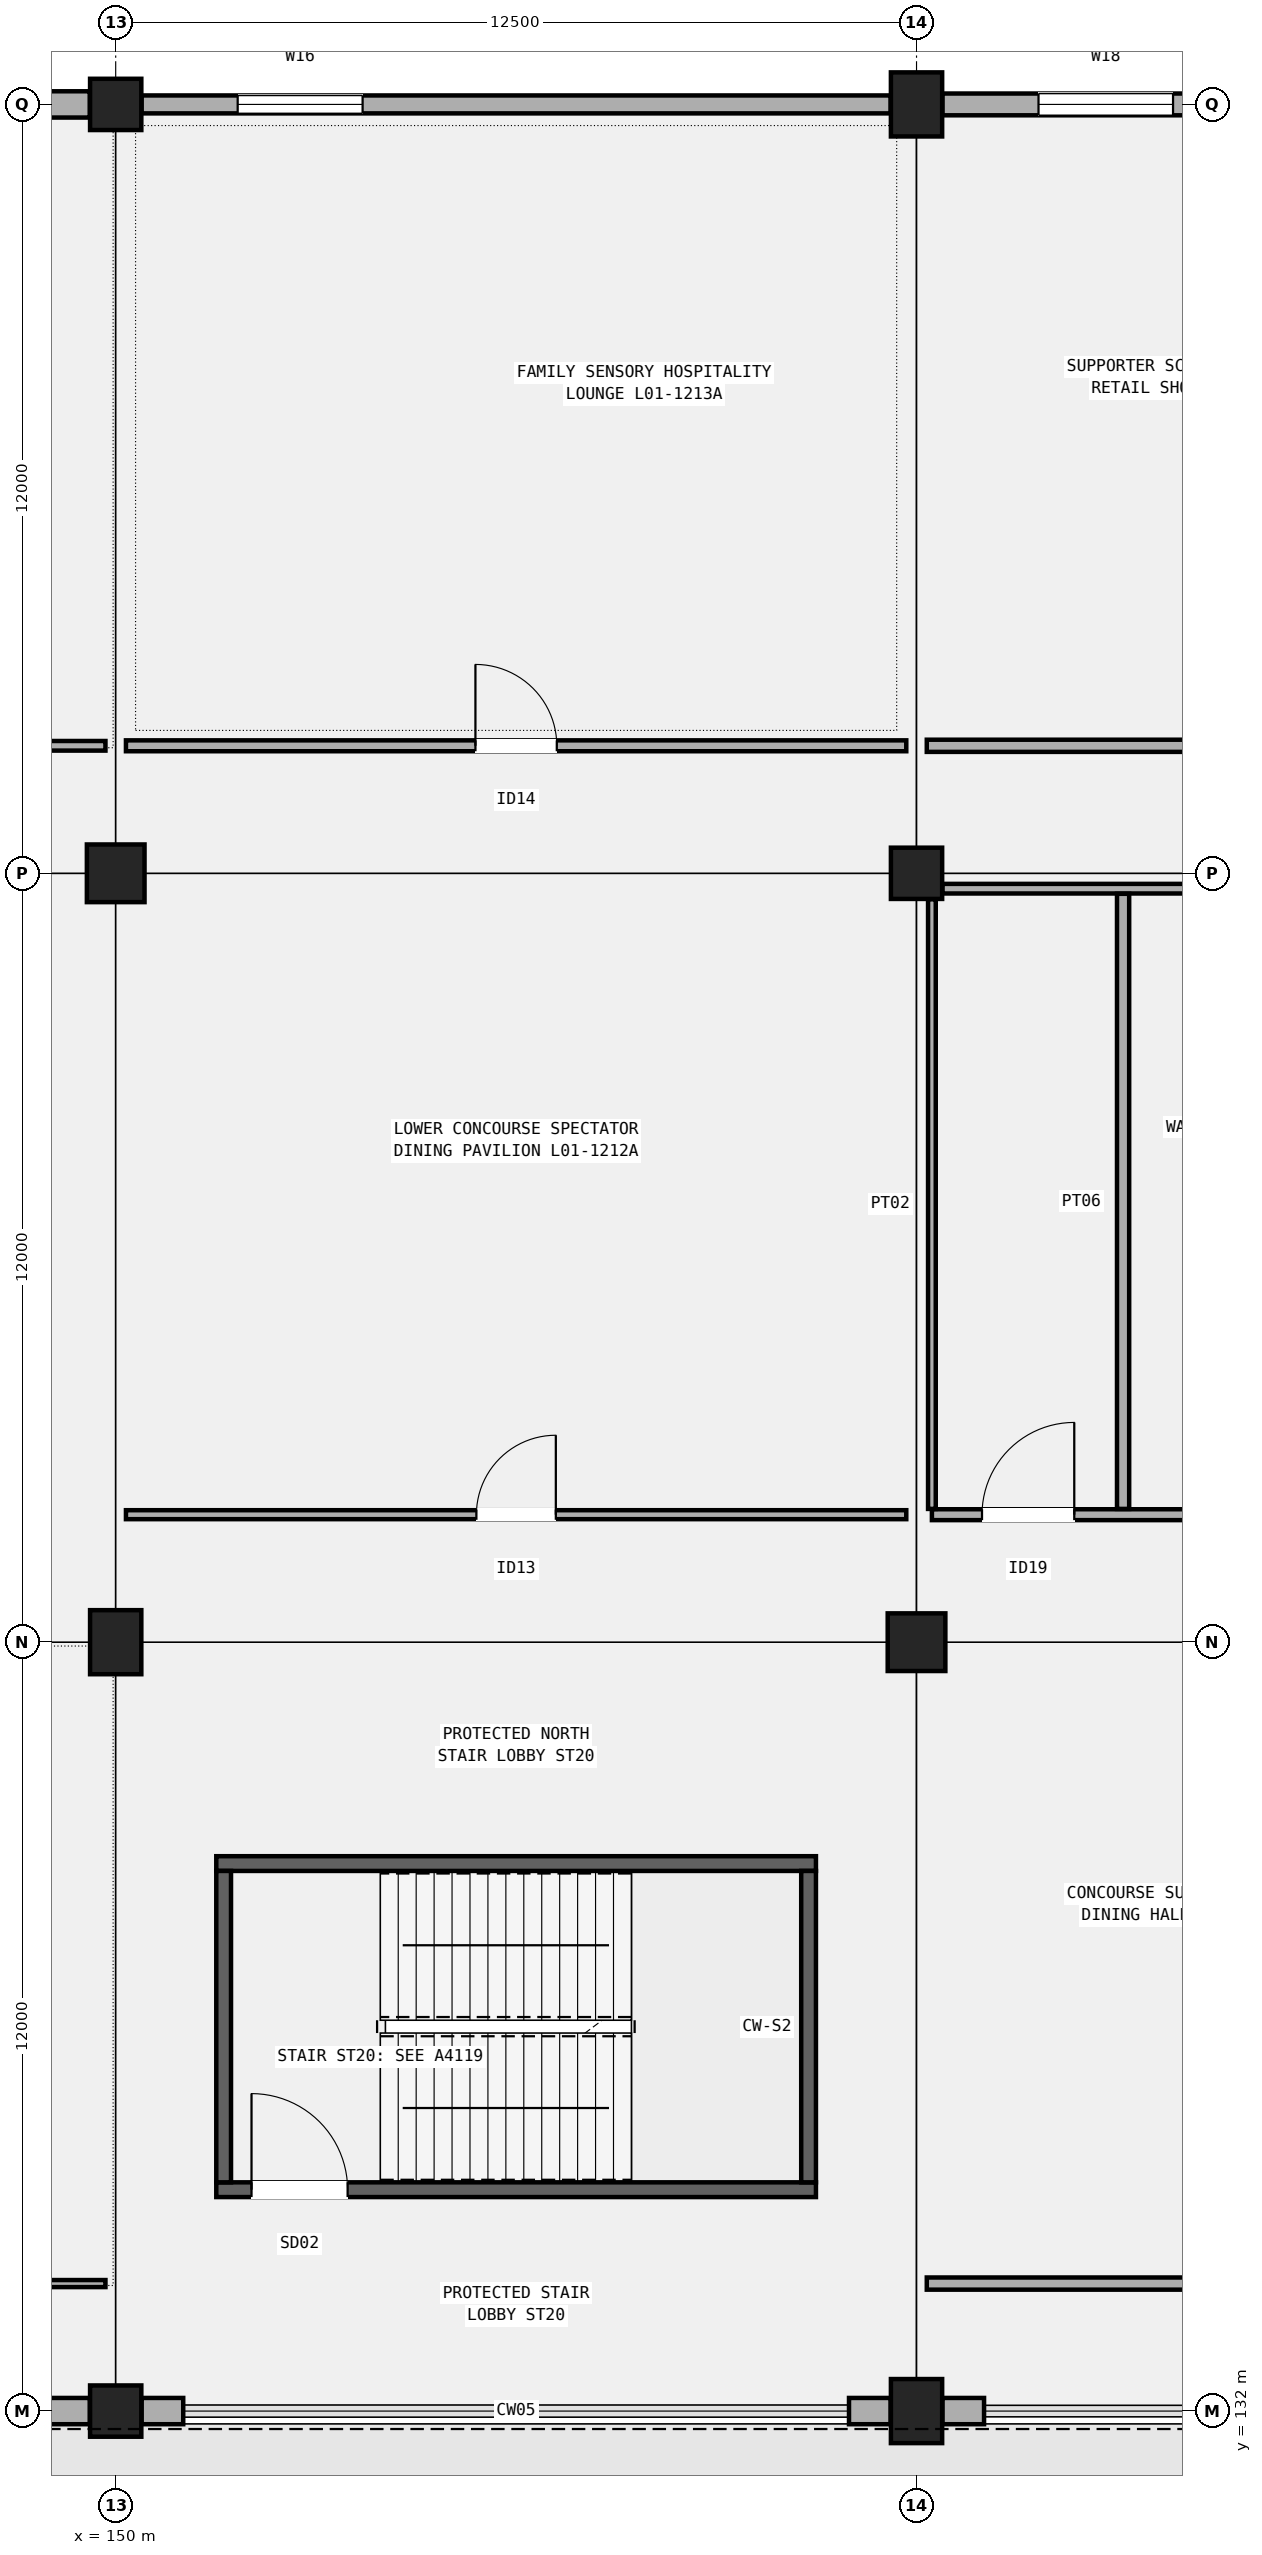
"""IFC4 building model, lengths in metres.
Left out: names, types, materials, properties, quantities, classifications, styles, units other than length and angle.
Written with IfcOpenShell. Run it as: python <this file> out.ifc"""

import sys

from ifc_helpers import new_model, si_unit, direction, frame, frame_2d, origin, origin_2d, place, context, subcontext, project, spatial, rectangle, extrude, element, fill, save


model = new_model("IFC4")
c1 = context("Model", 3, precision=1e-05, world=origin(), true_north=direction((0.0, 1.0)))
c2 = subcontext(c1, "Body", "Model", "MODEL_VIEW")
j1 = project(units=[si_unit("LENGTHUNIT", "METRE"), si_unit("PLANEANGLEUNIT", "RADIAN")], contexts=[c1])
p1 = place(None, origin())
s1 = spatial("IfcSite", under=j1, at=p1, CompositionType="ELEMENT")
p2 = place(p1, origin())
s2 = spatial("IfcBuilding", under=s1, at=p2, CompositionType="ELEMENT")
p3 = place(p2, frame((0.0, 0.0, 5.4)))
s3 = spatial("IfcBuildingStorey", under=s2, at=p3, CompositionType="ELEMENT", Elevation=5.4)
p4 = place(p3, frame((150.0, 132.0, 0.0), z_axis=(0.0, 0.0, 1.0), x_axis=(1.0, 0.0, 0.0)))
e1 = element("IfcColumn", 1, at=p4, inside=s3, PredefinedType="COLUMN", context=c2, shape_type="SweptSolid", body=[
    extrude(rectangle(XDim=0.8, YDim=0.8, at=origin_2d()), origin(), (0.0, 0.0, 1.0), 4.8),
])
p5 = place(p3, frame((150.0, 144.0, 0.0), z_axis=(0.0, 0.0, 1.0), x_axis=(1.0, 0.0, 0.0)))
e2 = element("IfcColumn", 2, at=p5, inside=s3, PredefinedType="COLUMN", context=c2, shape_type="SweptSolid", body=[
    extrude(rectangle(XDim=0.8, YDim=1.0, at=origin_2d()), origin(), (0.0, 0.0, 1.0), 4.8),
])
p6 = place(p3, frame((150.0, 156.0, 0.0), z_axis=(0.0, 0.0, 1.0), x_axis=(1.0, 0.0, 0.0)))
e3 = element("IfcColumn", 3, at=p6, inside=s3, PredefinedType="COLUMN", context=c2, shape_type="SweptSolid", body=[
    extrude(rectangle(XDim=0.9, YDim=0.9, at=origin_2d()), origin(), (0.0, 0.0, 1.0), 4.8),
])
p7 = place(p3, frame((150.0, 168.0, 0.0), z_axis=(0.0, 0.0, 1.0), x_axis=(1.0, 0.0, 0.0)))
e4 = element("IfcColumn", 4, at=p7, inside=s3, PredefinedType="COLUMN", context=c2, shape_type="SweptSolid", body=[
    extrude(rectangle(XDim=0.8, YDim=0.8, at=origin_2d()), origin(), (0.0, 0.0, 1.0), 4.8),
])
p8 = place(p3, frame((162.5, 132.0, 0.0), z_axis=(0.0, 0.0, 1.0), x_axis=(1.0, 0.0, 0.0)))
e5 = element("IfcColumn", 5, at=p8, inside=s3, PredefinedType="COLUMN", context=c2, shape_type="SweptSolid", body=[
    extrude(rectangle(XDim=0.8, YDim=1.0, at=origin_2d()), origin(), (0.0, 0.0, 1.0), 4.8),
])
p9 = place(p3, frame((162.5, 144.0, 0.0), z_axis=(0.0, 0.0, 1.0), x_axis=(1.0, 0.0, 0.0)))
e6 = element("IfcColumn", 6, at=p9, inside=s3, PredefinedType="COLUMN", context=c2, shape_type="SweptSolid", body=[
    extrude(rectangle(XDim=0.9, YDim=0.9, at=origin_2d()), origin(), (0.0, 0.0, 1.0), 4.8),
])
p10 = place(p3, frame((162.5, 156.0, 0.0), z_axis=(0.0, 0.0, 1.0), x_axis=(1.0, 0.0, 0.0)))
e7 = element("IfcColumn", 7, at=p10, inside=s3, PredefinedType="COLUMN", context=c2, shape_type="SweptSolid", body=[
    extrude(rectangle(XDim=0.8, YDim=0.8, at=origin_2d()), origin(), (0.0, 0.0, 1.0), 4.8),
])
p11 = place(p3, frame((162.5, 168.0, 0.0), z_axis=(0.0, 0.0, 1.0), x_axis=(1.0, 0.0, 0.0)))
e8 = element("IfcColumn", 8, at=p11, inside=s3, PredefinedType="COLUMN", context=c2, shape_type="SweptSolid", body=[
    extrude(rectangle(XDim=0.8, YDim=1.0, at=origin_2d()), origin(), (0.0, 0.0, 1.0), 4.8),
])
p12 = place(p3, frame((148.946, 132.0, 0.0), z_axis=(0.0, 0.0, 1.0), x_axis=(1.0, 0.0, 0.0)))
e9 = element("IfcWall", 9, at=p12, inside=s3, PredefinedType="SOLIDWALL", context=c2, shape_type="SweptSolid", body=[
    extrude(rectangle(XDim=0.65, YDim=0.41, at=frame_2d((0.325, 0.0))), origin(), (0.0, 0.0, 1.0), 4.15),
])
p13 = place(p3, frame((137.954, 168.0, 0.0), z_axis=(0.0, 0.0, 1.0), x_axis=(1.0, 0.0, 0.0)))
e10 = element("IfcWall", 10, at=p13, inside=s3, PredefinedType="SOLIDWALL", context=c2, shape_type="SweptSolid", body=[
    extrude(rectangle(XDim=11.642, YDim=0.41, at=frame_2d((5.821, 0.0))), origin(), (0.0, 0.0, 1.0), 4.2),
])
p14 = place(p13, frame((1.5, 0.0, 0.95)))
e11 = element("IfcOpeningElement", 11, at=p14, cuts=e10, PredefinedType="OPENING", context=c2, shape_type="SweptSolid", body=[
    extrude(rectangle(XDim=1.8, YDim=2.15, at=frame_2d((0.9, 1.075))), frame((0.0, 0.215, 0.0), z_axis=(0.0, -1.0, 0.0), x_axis=(1.0, 0.0, 0.0)), (0.0, 0.0, 1.0), 0.43),
])
for number, where, z_axis, x_axis in (
    (12, (150.404, 132.0, 0.0), (0.0, 0.0, 1.0), (1.0, 0.0, 0.0)),
    (13, (161.446, 132.0, 0.0), (0.0, 0.0, 1.0), (1.0, 0.0, 0.0)),
):
    element("IfcWall", number, at=place(p3, frame(where, z_axis=z_axis, x_axis=x_axis)), inside=s3, PredefinedType="SOLIDWALL", context=c2, shape_type="SweptSolid", body=[
        extrude(rectangle(XDim=0.65, YDim=0.41, at=frame_2d((0.325, 0.0))), origin(), (0.0, 0.0, 1.0), 4.2),
    ])
p15 = place(p3, frame((150.404, 168.0, 0.0), z_axis=(0.0, 0.0, 1.0), x_axis=(1.0, 0.0, 0.0)))
e14 = element("IfcWall", 14, at=p15, inside=s3, PredefinedType="SOLIDWALL", context=c2, shape_type="SweptSolid", body=[
    extrude(rectangle(XDim=11.692, YDim=0.28, at=frame_2d((5.846, 0.0))), origin(), (0.0, 0.0, 1.0), 4.15),
])
p16 = place(p15, frame((1.5, 0.0, 0.95)))
e15 = element("IfcOpeningElement", 15, at=p16, cuts=e14, PredefinedType="OPENING", context=c2, shape_type="SweptSolid", body=[
    extrude(rectangle(XDim=1.95, YDim=1.9, at=frame_2d((0.975, 0.95))), frame((0.0, 0.15, 0.0), z_axis=(0.0, -1.0, 0.0), x_axis=(1.0, 0.0, 0.0)), (0.0, 0.0, 1.0), 0.3),
])
p17 = place(p3, frame((162.904, 132.0, 0.0), z_axis=(0.0, 0.0, 1.0), x_axis=(1.0, 0.0, 0.0)))
e16 = element("IfcWall", 16, at=p17, inside=s3, PredefinedType="SOLIDWALL", context=c2, shape_type="SweptSolid", body=[
    extrude(rectangle(XDim=0.65, YDim=0.41, at=frame_2d((0.325, 0.0))), origin(), (0.0, 0.0, 1.0), 4.15),
])
p18 = place(p3, frame((162.904, 168.0, 0.0), z_axis=(0.0, 0.0, 1.0), x_axis=(1.0, 0.0, 0.0)))
e17 = element("IfcWall", 17, at=p18, inside=s3, PredefinedType="SOLIDWALL", context=c2, shape_type="SweptSolid", body=[
    extrude(rectangle(XDim=11.642, YDim=0.34, at=frame_2d((5.821, 0.0))), origin(), (0.0, 0.0, 1.0), 4.2),
])
p19 = place(p18, frame((1.5, 0.0, 0.95)))
e18 = element("IfcOpeningElement", 18, at=p19, cuts=e17, PredefinedType="OPENING", context=c2, shape_type="SweptSolid", body=[
    extrude(rectangle(XDim=2.1, YDim=1.85, at=frame_2d((1.05, 0.925))), frame((0.0, 0.18, 0.0), z_axis=(0.0, -1.0, 0.0), x_axis=(1.0, 0.0, 0.0)), (0.0, 0.0, 1.0), 0.36),
])
p20 = place(p3, frame((151.57, 135.455, 0.0), z_axis=(0.0, 0.0, 1.0), x_axis=(1.0, 0.0, 0.0)))
e19 = element("IfcWall", 19, at=p20, inside=s3, PredefinedType="SHEAR", context=c2, shape_type="SweptSolid", body=[
    extrude(rectangle(XDim=9.36, YDim=0.23, at=frame_2d((4.68, 0.0))), origin(), (0.0, 0.0, 1.0), 4.55),
])
p21 = place(p20, frame((0.55, 0.0, 0.0)))
e20 = element("IfcOpeningElement", 20, at=p21, cuts=e19, PredefinedType="OPENING", context=c2, shape_type="SweptSolid", body=[
    extrude(rectangle(XDim=1.5, YDim=2.2, at=frame_2d((0.75, 1.1))), frame((0.0, 0.125, 0.0), z_axis=(0.0, -1.0, 0.0), x_axis=(1.0, 0.0, 0.0)), (0.0, 0.0, 1.0), 0.25),
])
p22 = place(p3, frame((151.57, 140.545, 0.0), z_axis=(0.0, 0.0, 1.0), x_axis=(1.0, 0.0, 0.0)))
e21 = element("IfcWall", 21, at=p22, inside=s3, PredefinedType="SHEAR", context=c2, shape_type="SweptSolid", body=[
    extrude(rectangle(XDim=9.36, YDim=0.23, at=frame_2d((4.68, 0.0))), origin(), (0.0, 0.0, 1.0), 4.55),
])
for number, where, z_axis, x_axis in (
    (22, (151.685, 135.57, 0.0), (0.0, 0.0, 1.0), (0.0, 1.0, 0.0)),
    (23, (160.815, 135.57, 0.0), (0.0, 0.0, 1.0), (0.0, 1.0, 0.0)),
):
    element("IfcWall", number, at=place(p3, frame(where, z_axis=z_axis, x_axis=x_axis)), inside=s3, PredefinedType="SHEAR", context=c2, shape_type="SweptSolid", body=[
        extrude(rectangle(XDim=4.86, YDim=0.23, at=frame_2d((2.43, 0.0))), origin(), (0.0, 0.0, 1.0), 4.55),
    ])
p23 = place(p3, frame((139.42, 133.99, 0.0), z_axis=(0.0, 0.0, 1.0), x_axis=(1.0, 0.0, 0.0)))
e24 = element("IfcWall", 24, at=p23, inside=s3, PredefinedType="PARTITIONING", context=c2, shape_type="SweptSolid", body=[
    extrude(rectangle(XDim=10.42, YDim=0.11, at=frame_2d((5.21, 0.0))), origin(), (0.0, 0.0, 1.0), 3.92),
])
p24 = place(p23, frame((4.65, 0.0, 0.0)))
e25 = element("IfcOpeningElement", 25, at=p24, cuts=e24, PredefinedType="OPENING", context=c2, shape_type="SweptSolid", body=[
    extrude(rectangle(XDim=1.12, YDim=2.18, at=frame_2d((0.56, 1.09))), frame((0.0, 0.065, 0.0), z_axis=(0.0, -1.0, 0.0), x_axis=(1.0, 0.0, 0.0)), (0.0, 0.0, 1.0), 0.13),
])
p25 = place(p3, frame((139.42, 157.99, 0.0), z_axis=(0.0, 0.0, 1.0), x_axis=(1.0, 0.0, 0.0)))
e26 = element("IfcWall", 26, at=p25, inside=s3, PredefinedType="PARTITIONING", context=c2, shape_type="SweptSolid", body=[
    extrude(rectangle(XDim=10.42, YDim=0.15, at=frame_2d((5.21, 0.0))), origin(), (0.0, 0.0, 1.0), 3.92),
])
p26 = place(p25, frame((4.635, 0.0, 0.0)))
e27 = element("IfcOpeningElement", 27, at=p26, cuts=e26, PredefinedType="OPENING", context=c2, shape_type="SweptSolid", body=[
    extrude(rectangle(XDim=1.15, YDim=2.15, at=frame_2d((0.575, 1.075))), frame((0.0, 0.085, 0.0), z_axis=(0.0, -1.0, 0.0), x_axis=(1.0, 0.0, 0.0)), (0.0, 0.0, 1.0), 0.17),
])
p27 = place(p3, frame((150.16, 145.99, 0.0), z_axis=(0.0, 0.0, 1.0), x_axis=(1.0, 0.0, 0.0)))
e28 = element("IfcWall", 28, at=p27, inside=s3, PredefinedType="PARTITIONING", context=c2, shape_type="SweptSolid", body=[
    extrude(rectangle(XDim=12.18, YDim=0.14, at=frame_2d((6.09, 0.0))), origin(), (0.0, 0.0, 1.0), 3.92),
])
p28 = place(p27, frame((5.47, 0.0, 0.0)))
e29 = element("IfcOpeningElement", 29, at=p28, cuts=e28, PredefinedType="OPENING", context=c2, shape_type="SweptSolid", body=[
    extrude(rectangle(XDim=1.24, YDim=2.22, at=frame_2d((0.62, 1.11))), frame((0.0, 0.08, 0.0), z_axis=(0.0, -1.0, 0.0), x_axis=(1.0, 0.0, 0.0)), (0.0, 0.0, 1.0), 0.16),
])
p29 = place(p3, frame((150.16, 157.99, 0.0), z_axis=(0.0, 0.0, 1.0), x_axis=(1.0, 0.0, 0.0)))
e30 = element("IfcWall", 30, at=p29, inside=s3, PredefinedType="PARTITIONING", context=c2, shape_type="SweptSolid", body=[
    extrude(rectangle(XDim=12.18, YDim=0.17, at=frame_2d((6.09, 0.0))), origin(), (0.0, 0.0, 1.0), 3.92),
])
p30 = place(p29, frame((5.455, 0.0, 0.0)))
e31 = element("IfcOpeningElement", 31, at=p30, cuts=e30, PredefinedType="OPENING", context=c2, shape_type="SweptSolid", body=[
    extrude(rectangle(XDim=1.27, YDim=2.2, at=frame_2d((0.635, 1.1))), frame((0.0, 0.095, 0.0), z_axis=(0.0, -1.0, 0.0), x_axis=(1.0, 0.0, 0.0)), (0.0, 0.0, 1.0), 0.19),
])
p31 = place(p3, frame((162.66, 133.99, 0.0), z_axis=(0.0, 0.0, 1.0), x_axis=(1.0, 0.0, 0.0)))
e32 = element("IfcWall", 32, at=p31, inside=s3, PredefinedType="PARTITIONING", context=c2, shape_type="SweptSolid", body=[
    extrude(rectangle(XDim=12.18, YDim=0.19, at=frame_2d((6.09, 0.0))), origin(), (0.0, 0.0, 1.0), 3.92),
])
p32 = place(p31, frame((5.39, 0.0, 0.0)))
e33 = element("IfcOpeningElement", 33, at=p32, cuts=e32, PredefinedType="OPENING", context=c2, shape_type="SweptSolid", body=[
    extrude(rectangle(XDim=1.4, YDim=2.24, at=frame_2d((0.7, 1.12))), frame((0.0, 0.105, 0.0), z_axis=(0.0, -1.0, 0.0), x_axis=(1.0, 0.0, 0.0)), (0.0, 0.0, 1.0), 0.21),
])
p33 = place(p3, frame((162.74, 145.99, 0.0), z_axis=(0.0, 0.0, 1.0), x_axis=(1.0, 0.0, 0.0)))
e34 = element("IfcWall", 34, at=p33, inside=s3, PredefinedType="PARTITIONING", context=c2, shape_type="SweptSolid", body=[
    extrude(rectangle(XDim=12.02, YDim=0.17, at=frame_2d((6.01, 0.0))), origin(), (0.0, 0.0, 1.0), 3.92),
])
p34 = place(p33, frame((0.782, 0.0, 0.0)))
e35 = element("IfcOpeningElement", 35, at=p34, cuts=e34, PredefinedType="OPENING", context=c2, shape_type="SweptSolid", body=[
    extrude(rectangle(XDim=1.44, YDim=2.26, at=frame_2d((0.72, 1.13))), frame((0.0, 0.095, 0.0), z_axis=(0.0, -1.0, 0.0), x_axis=(1.0, 0.0, 0.0)), (0.0, 0.0, 1.0), 0.19),
])
p35 = place(p33, frame((4.518, 0.0, 0.0)))
e36 = element("IfcOpeningElement", 36, at=p35, cuts=e34, PredefinedType="OPENING", context=c2, shape_type="SweptSolid", body=[
    extrude(rectangle(XDim=1.48, YDim=2.24, at=frame_2d((0.74, 1.12))), frame((0.0, 0.095, 0.0), z_axis=(0.0, -1.0, 0.0), x_axis=(1.0, 0.0, 0.0)), (0.0, 0.0, 1.0), 0.19),
])
p36 = place(p33, frame((9.006, 0.0, 0.0)))
e37 = element("IfcOpeningElement", 37, at=p36, cuts=e34, PredefinedType="OPENING", context=c2, shape_type="SweptSolid", body=[
    extrude(rectangle(XDim=1.52, YDim=2.28, at=frame_2d((0.76, 1.14))), frame((0.0, 0.095, 0.0), z_axis=(0.0, -1.0, 0.0), x_axis=(1.0, 0.0, 0.0)), (0.0, 0.0, 1.0), 0.19),
])
p37 = place(p3, frame((162.74, 146.08, 0.0), z_axis=(0.0, 0.0, 1.0), x_axis=(0.0, 1.0, 0.0)))
e38 = element("IfcWall", 38, at=p37, inside=s3, PredefinedType="PARTITIONING", context=c2, shape_type="SweptSolid", body=[
    extrude(rectangle(XDim=9.516, YDim=0.12, at=frame_2d((4.758, 0.0))), origin(), (0.0, 0.0, 1.0), 3.81),
])
p38 = place(p3, frame((162.904, 155.76, 0.0), z_axis=(0.0, 0.0, 1.0), x_axis=(1.0, 0.0, 0.0)))
e39 = element("IfcWall", 39, at=p38, inside=s3, PredefinedType="PARTITIONING", context=c2, shape_type="SweptSolid", body=[
    extrude(rectangle(XDim=11.692, YDim=0.15, at=frame_2d((5.846, 0.0))), origin(), (0.0, 0.0, 1.0), 3.92),
])
p39 = place(p3, frame((165.724, 146.08, 0.0), z_axis=(0.0, 0.0, 1.0), x_axis=(0.0, 1.0, 0.0)))
e40 = element("IfcWall", 40, at=p39, inside=s3, PredefinedType="PARTITIONING", context=c2, shape_type="SweptSolid", body=[
    extrude(rectangle(XDim=9.6, YDim=0.19, at=frame_2d((4.8, 0.0))), origin(), (0.0, 0.0, 1.0), 3.92),
])
p40 = place(p3, frame((162.66, 157.99, 0.0), z_axis=(0.0, 0.0, 1.0), x_axis=(1.0, 0.0, 0.0)))
e41 = element("IfcWall", 41, at=p40, inside=s3, PredefinedType="PARTITIONING", context=c2, shape_type="SweptSolid", body=[
    extrude(rectangle(XDim=12.316, YDim=0.19, at=frame_2d((6.158, 0.0))), origin(), (0.0, 0.0, 1.0), 3.92),
])
p41 = place(p40, frame((5.31, 0.0, 0.0)))
e42 = element("IfcOpeningElement", 42, at=p41, cuts=e41, PredefinedType="OPENING", context=c2, shape_type="SweptSolid", body=[
    extrude(rectangle(XDim=1.56, YDim=2.26, at=frame_2d((0.78, 1.13))), frame((0.0, 0.105, 0.0), z_axis=(0.0, -1.0, 0.0), x_axis=(1.0, 0.0, 0.0)), (0.0, 0.0, 1.0), 0.21),
])
p42 = place(p16, origin())
e43 = element("IfcWindow", 43, at=p42, inside=s3, PartitioningType="SINGLE_PANEL", PredefinedType="WINDOW", context=c2, shape_type="SweptSolid", body=[
    extrude(rectangle(XDim=1.95, YDim=1.9, at=frame_2d((0.975, 0.95))), frame((0.0, 0.03, 0.0), z_axis=(0.0, -1.0, 0.0), x_axis=(1.0, 0.0, 0.0)), (0.0, 0.0, 1.0), 0.06),
])
fill(e15, e43)
p43 = place(p19, origin())
e44 = element("IfcWindow", 44, at=p43, inside=s3, PartitioningType="SINGLE_PANEL", PredefinedType="WINDOW", context=c2, shape_type="SweptSolid", body=[
    extrude(rectangle(XDim=2.1, YDim=1.85, at=frame_2d((1.05, 0.925))), frame((0.0, 0.03, 0.0), z_axis=(0.0, -1.0, 0.0), x_axis=(1.0, 0.0, 0.0)), (0.0, 0.0, 1.0), 0.06),
])
fill(e18, e44)
p44 = place(p21, origin())
e45 = element("IfcDoor", 45, at=p44, inside=s3, OperationType="SINGLE_SWING_LEFT", PredefinedType="DOOR", context=c2, shape_type="SweptSolid", body=[
    extrude(rectangle(XDim=1.5, YDim=2.2, at=frame_2d((0.75, 1.1))), frame((0.0, 0.025, 0.0), z_axis=(0.0, -1.0, 0.0), x_axis=(1.0, 0.0, 0.0)), (0.0, 0.0, 1.0), 0.05),
])
fill(e20, e45)
p45 = place(p28, origin())
e46 = element("IfcDoor", 46, at=p45, inside=s3, OperationType="SINGLE_SWING_RIGHT", PredefinedType="DOOR", context=c2, shape_type="SweptSolid", body=[
    extrude(rectangle(XDim=1.24, YDim=2.22, at=frame_2d((0.62, 1.11))), frame((0.0, 0.025, 0.0), z_axis=(0.0, -1.0, 0.0), x_axis=(1.0, 0.0, 0.0)), (0.0, 0.0, 1.0), 0.05),
])
fill(e29, e46)
p46 = place(p30, origin())
e47 = element("IfcDoor", 47, at=p46, inside=s3, OperationType="SINGLE_SWING_LEFT", PredefinedType="DOOR", context=c2, shape_type="SweptSolid", body=[
    extrude(rectangle(XDim=1.27, YDim=2.2, at=frame_2d((0.635, 1.1))), frame((0.0, 0.025, 0.0), z_axis=(0.0, -1.0, 0.0), x_axis=(1.0, 0.0, 0.0)), (0.0, 0.0, 1.0), 0.05),
])
fill(e31, e47)
p47 = place(p34, origin())
e48 = element("IfcDoor", 48, at=p47, inside=s3, OperationType="SINGLE_SWING_RIGHT", PredefinedType="DOOR", context=c2, shape_type="SweptSolid", body=[
    extrude(rectangle(XDim=1.44, YDim=2.26, at=frame_2d((0.72, 1.13))), frame((0.0, 0.025, 0.0), z_axis=(0.0, -1.0, 0.0), x_axis=(1.0, 0.0, 0.0)), (0.0, 0.0, 1.0), 0.05),
])
fill(e35, e48)
save(model, sys.argv[1])
